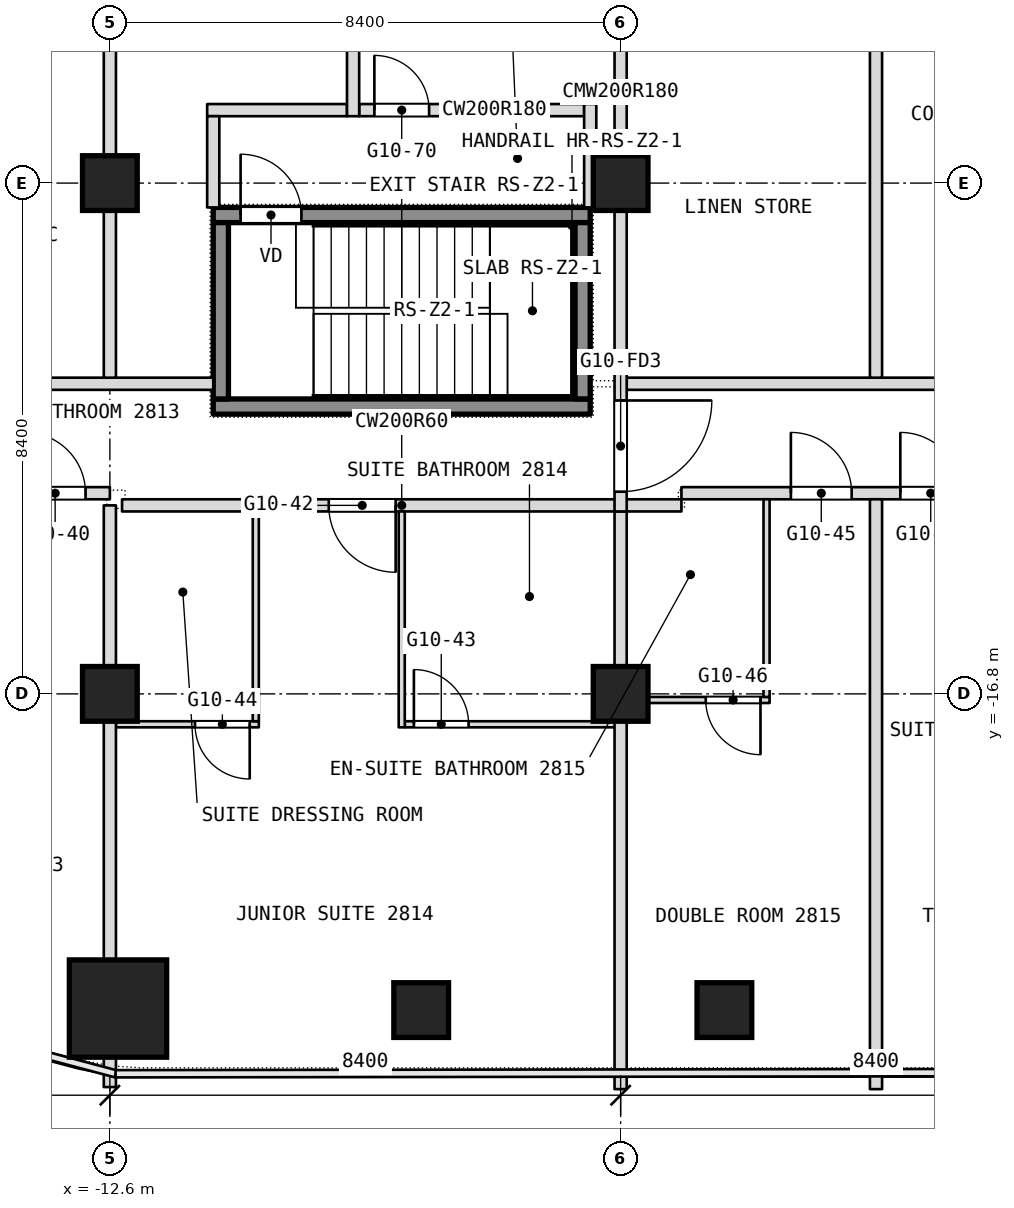
"""IFC4 building model, lengths in metres.
Left out: names, types, materials, properties, quantities, classifications, styles, units other than length and angle.
Written with IfcOpenShell. Run it as: python <this file> out.ifc"""

import sys

from ifc_helpers import new_model, si_unit, direction, frame, frame_2d, origin, origin_2d, place, context, subcontext, project, spatial, rectangle, extrude, element, fill, save


model = new_model("IFC4")
c1 = context("Model", 3, precision=1e-05, world=origin(), true_north=direction((0.0, 1.0)))
c2 = subcontext(c1, "Body", "Model", "MODEL_VIEW")
j1 = project(units=[si_unit("LENGTHUNIT", "METRE"), si_unit("PLANEANGLEUNIT", "RADIAN")], contexts=[c1])
p1 = place(None, origin())
s1 = spatial("IfcSite", under=j1, at=p1, CompositionType="ELEMENT")
p2 = place(p1, origin())
s2 = spatial("IfcBuilding", under=s1, at=p2, CompositionType="ELEMENT")
p3 = place(p2, frame((0.0, 0.0, 126.5)))
s3 = spatial("IfcBuildingStorey", under=s2, at=p3, CompositionType="ELEMENT", Elevation=126.5)
p4 = place(p3, frame((-12.466, -21.975, 0.0), z_axis=(0.0, 0.0, 1.0), x_axis=(1.0, 0.0, 0.0)))
e1 = element("IfcColumn", 1, at=p4, inside=s3, PredefinedType="COLUMN", context=c2, shape_type="SweptSolid", body=[
    extrude(rectangle(XDim=1.6, YDim=1.6, at=origin_2d()), origin(), (0.0, 0.0, 1.0), 3.6),
])
for number, where, z_axis, x_axis in (
    (2, (-12.6, -16.8, 0.0), (0.0, 0.0, 1.0), (1.0, 0.0, 0.0)),
    (3, (-12.6, -8.4, 0.0), (0.0, 0.0, 1.0), (1.0, 0.0, 0.0)),
    (4, (-4.2, -16.8, 0.0), (0.0, 0.0, 1.0), (1.0, 0.0, 0.0)),
    (5, (-4.2, -8.4, 0.0), (0.0, 0.0, 1.0), (1.0, 0.0, 0.0)),
    (6, (-2.493, -22.0, 0.0), (0.0, 0.0, 1.0), (1.0, 0.0, 0.0)),
    (7, (-7.48, -22.0, 0.0), (0.0, 0.0, 1.0), (1.0, 0.0, 0.0)),
):
    element("IfcColumn", number, at=place(p3, frame(where, z_axis=z_axis, x_axis=x_axis)), inside=s3, PredefinedType="COLUMN", context=c2, shape_type="SweptSolid", body=[
        extrude(rectangle(XDim=0.9, YDim=0.9, at=origin_2d()), origin(), (0.0, 0.0, 1.0), 3.6),
    ])
p5 = place(p3, frame((-12.5, -17.3, 0.0), z_axis=(0.0, 0.0, 1.0), x_axis=(1.0, 0.0, 0.0)))
e8 = element("IfcWall", 8, at=p5, inside=s3, PredefinedType="PARTITIONING", context=c2, shape_type="SweptSolid", body=[
    extrude(rectangle(XDim=2.35, YDim=0.1, at=frame_2d((1.175, 0.0))), origin(), (0.0, 0.0, 1.0), 3.34),
])
p6 = place(p5, frame((1.3, 0.0, 0.0)))
e9 = element("IfcOpeningElement", 9, at=p6, cuts=e8, PredefinedType="OPENING", context=c2, shape_type="SweptSolid", body=[
    extrude(rectangle(XDim=0.9, YDim=2.1, at=frame_2d((0.45, 1.05))), frame((0.0, 0.05, 0.0), z_axis=(0.0, -1.0, 0.0), x_axis=(1.0, 0.0, 0.0)), (0.0, 0.0, 1.0), 0.1),
])
p7 = place(p3, frame((-7.75, -17.3, 0.0), z_axis=(0.0, 0.0, 1.0), x_axis=(1.0, 0.0, 0.0)))
e10 = element("IfcWall", 10, at=p7, inside=s3, PredefinedType="PARTITIONING", context=c2, shape_type="SweptSolid", body=[
    extrude(rectangle(XDim=3.65, YDim=0.1, at=frame_2d((1.825, 0.0))), origin(), (0.0, 0.0, 1.0), 3.34),
])
p8 = place(p7, frame((0.15, 0.0, 0.0)))
e11 = element("IfcOpeningElement", 11, at=p8, cuts=e10, PredefinedType="OPENING", context=c2, shape_type="SweptSolid", body=[
    extrude(rectangle(XDim=0.9, YDim=2.1, at=frame_2d((0.45, 1.05))), frame((0.0, 0.05, 0.0), z_axis=(0.0, -1.0, 0.0), x_axis=(1.0, 0.0, 0.0)), (0.0, 0.0, 1.0), 0.1),
])
p9 = place(p3, frame((-4.1, -16.9, 0.0), z_axis=(0.0, 0.0, 1.0), x_axis=(1.0, 0.0, 0.0)))
e12 = element("IfcWall", 12, at=p9, inside=s3, PredefinedType="PARTITIONING", context=c2, shape_type="SweptSolid", body=[
    extrude(rectangle(XDim=2.35, YDim=0.1, at=frame_2d((1.175, 0.0))), origin(), (0.0, 0.0, 1.0), 2.89),
])
p10 = place(p9, frame((1.3, 0.0, 0.0)))
e13 = element("IfcOpeningElement", 13, at=p10, cuts=e12, PredefinedType="OPENING", context=c2, shape_type="SweptSolid", body=[
    extrude(rectangle(XDim=0.9, YDim=2.1, at=frame_2d((0.45, 1.05))), frame((0.0, 0.05, 0.0), z_axis=(0.0, -1.0, 0.0), x_axis=(1.0, 0.0, 0.0)), (0.0, 0.0, 1.0), 0.1),
])
p11 = place(p3, frame((-12.4, -13.7, 0.0), z_axis=(0.0, 0.0, 1.0), x_axis=(1.0, 0.0, 0.0)))
e14 = element("IfcWall", 14, at=p11, inside=s3, PredefinedType="PARTITIONING", context=c2, shape_type="SweptSolid", body=[
    extrude(rectangle(XDim=9.2, YDim=0.2, at=frame_2d((4.6, 0.0))), origin(), (0.0, 0.0, 1.0), 3.34),
])
p12 = place(p11, frame((3.4, 0.0, 0.0)))
e15 = element("IfcOpeningElement", 15, at=p12, cuts=e14, PredefinedType="OPENING", context=c2, shape_type="SweptSolid", body=[
    extrude(rectangle(XDim=1.1, YDim=2.1, at=frame_2d((0.55, 1.05))), frame((0.0, 0.1, 0.0), z_axis=(0.0, -1.0, 0.0), x_axis=(1.0, 0.0, 0.0)), (0.0, 0.0, 1.0), 0.2),
])
p13 = place(p3, frame((-16.7, -13.5, 0.0), z_axis=(0.0, 0.0, 1.0), x_axis=(1.0, 0.0, 0.0)))
e16 = element("IfcWall", 16, at=p13, inside=s3, PredefinedType="PARTITIONING", context=c2, shape_type="SweptSolid", body=[
    extrude(rectangle(XDim=4.1, YDim=0.2, at=frame_2d((2.05, 0.0))), origin(), (0.0, 0.0, 1.0), 3.34),
])
p14 = place(p13, frame((2.7, 0.0, 0.0)))
e17 = element("IfcOpeningElement", 17, at=p14, cuts=e16, PredefinedType="OPENING", context=c2, shape_type="SweptSolid", body=[
    extrude(rectangle(XDim=1.0, YDim=2.1, at=frame_2d((0.5, 1.05))), frame((0.0, 0.1, 0.0), z_axis=(0.0, -1.0, 0.0), x_axis=(1.0, 0.0, 0.0)), (0.0, 0.0, 1.0), 0.2),
])
p15 = place(p3, frame((-3.2, -13.5, 0.0), z_axis=(0.0, 0.0, 1.0), x_axis=(1.0, 0.0, 0.0)))
e18 = element("IfcWall", 18, at=p15, inside=s3, PredefinedType="PARTITIONING", context=c2, shape_type="SweptSolid", body=[
    extrude(rectangle(XDim=19.9, YDim=0.2, at=frame_2d((9.95, 0.0))), origin(), (0.0, 0.0, 1.0), 3.34),
])
p16 = place(p15, frame((1.8, 0.0, 0.0)))
e19 = element("IfcOpeningElement", 19, at=p16, cuts=e18, PredefinedType="OPENING", context=c2, shape_type="SweptSolid", body=[
    extrude(rectangle(XDim=1.0, YDim=2.1, at=frame_2d((0.5, 1.05))), frame((0.0, 0.1, 0.0), z_axis=(0.0, -1.0, 0.0), x_axis=(1.0, 0.0, 0.0)), (0.0, 0.0, 1.0), 0.2),
])
p17 = place(p15, frame((3.6, 0.0, 0.0)))
e20 = element("IfcOpeningElement", 20, at=p17, cuts=e18, PredefinedType="OPENING", context=c2, shape_type="SweptSolid", body=[
    extrude(rectangle(XDim=1.0, YDim=2.1, at=frame_2d((0.5, 1.05))), frame((0.0, 0.1, 0.0), z_axis=(0.0, -1.0, 0.0), x_axis=(1.0, 0.0, 0.0)), (0.0, 0.0, 1.0), 0.2),
])
p18 = place(p15, frame((11.0, 0.0, 0.0)))
e21 = element("IfcOpeningElement", 21, at=p18, cuts=e18, PredefinedType="OPENING", context=c2, shape_type="SweptSolid", body=[
    extrude(rectangle(XDim=1.1, YDim=2.1, at=frame_2d((0.55, 1.05))), frame((0.0, 0.1, 0.0), z_axis=(0.0, -1.0, 0.0), x_axis=(1.0, 0.0, 0.0)), (0.0, 0.0, 1.0), 0.2),
])
p19 = place(p15, frame((18.6, 0.0, 0.0)))
e22 = element("IfcOpeningElement", 22, at=p19, cuts=e18, PredefinedType="OPENING", context=c2, shape_type="SweptSolid", body=[
    extrude(rectangle(XDim=1.0, YDim=2.1, at=frame_2d((0.5, 1.05))), frame((0.0, 0.1, 0.0), z_axis=(0.0, -1.0, 0.0), x_axis=(1.0, 0.0, 0.0)), (0.0, 0.0, 1.0), 0.2),
])
p20 = place(p3, frame((-16.7, -11.7, 0.0), z_axis=(0.0, 0.0, 1.0), x_axis=(1.0, 0.0, 0.0)))
e23 = element("IfcWall", 23, at=p20, inside=s3, PredefinedType="PARTITIONING", context=c2, shape_type="SweptSolid", body=[
    extrude(rectangle(XDim=5.8, YDim=0.2, at=frame_2d((2.9, 0.0))), origin(), (0.0, 0.0, 1.0), 3.34),
])
p21 = place(p3, frame((-4.1, -11.7, 0.0), z_axis=(0.0, 0.0, 1.0), x_axis=(1.0, 0.0, 0.0)))
e24 = element("IfcWall", 24, at=p21, inside=s3, PredefinedType="PARTITIONING", context=c2, shape_type="SweptSolid", body=[
    extrude(rectangle(XDim=20.8, YDim=0.2, at=frame_2d((10.4, 0.0))), origin(), (0.0, 0.0, 1.0), 3.34),
])
p22 = place(p21, frame((14.1, 0.0, 0.0)))
e25 = element("IfcOpeningElement", 25, at=p22, cuts=e24, PredefinedType="OPENING", context=c2, shape_type="SweptSolid", body=[
    extrude(rectangle(XDim=1.0, YDim=2.1, at=frame_2d((0.5, 1.05))), frame((0.0, 0.1, 0.0), z_axis=(0.0, -1.0, 0.0), x_axis=(1.0, 0.0, 0.0)), (0.0, 0.0, 1.0), 0.2),
])
p23 = place(p3, frame((-11.0, -7.2, 0.0), z_axis=(0.0, 0.0, 1.0), x_axis=(1.0, 0.0, 0.0)))
e26 = element("IfcWall", 26, at=p23, inside=s3, PredefinedType="PARTITIONING", context=c2, shape_type="SweptSolid", body=[
    extrude(rectangle(XDim=2.3, YDim=0.2, at=frame_2d((1.15, 0.0))), origin(), (0.0, 0.0, 1.0), 3.34),
])
p24 = place(p3, frame((-8.5, -7.2, 0.0), z_axis=(0.0, 0.0, 1.0), x_axis=(1.0, 0.0, 0.0)))
e27 = element("IfcWall", 27, at=p24, inside=s3, PredefinedType="PARTITIONING", context=c2, shape_type="SweptSolid", body=[
    extrude(rectangle(XDim=3.7, YDim=0.2, at=frame_2d((1.85, 0.0))), origin(), (0.0, 0.0, 1.0), 3.34),
])
p25 = place(p24, frame((0.25, 0.0, 0.0)))
e28 = element("IfcOpeningElement", 28, at=p25, cuts=e27, PredefinedType="OPENING", context=c2, shape_type="SweptSolid", body=[
    extrude(rectangle(XDim=0.9, YDim=2.1, at=frame_2d((0.45, 1.05))), frame((0.0, 0.1, 0.0), z_axis=(0.0, -1.0, 0.0), x_axis=(1.0, 0.0, 0.0)), (0.0, 0.0, 1.0), 0.2),
])
p26 = place(p3, frame((0.0, -23.3, 0.0), z_axis=(0.0, 0.0, 1.0), x_axis=(0.0, 1.0, 0.0)))
e29 = element("IfcWall", 29, at=p26, inside=s3, PredefinedType="PARTITIONING", context=c2, shape_type="SweptSolid", body=[
    extrude(rectangle(XDim=9.7, YDim=0.2, at=frame_2d((4.85, 0.0))), origin(), (0.0, 0.0, 1.0), 3.34),
])
p27 = place(p3, frame((0.0, -11.6, 0.0), z_axis=(0.0, 0.0, 1.0), x_axis=(0.0, 1.0, 0.0)))
e30 = element("IfcWall", 30, at=p27, inside=s3, PredefinedType="PARTITIONING", context=c2, shape_type="SweptSolid", body=[
    extrude(rectangle(XDim=9.7, YDim=0.2, at=frame_2d((4.85, 0.0))), origin(), (0.0, 0.0, 1.0), 3.34),
])
p28 = place(p3, frame((-1.8, -16.85, 0.0), z_axis=(0.0, 0.0, 1.0), x_axis=(0.0, 1.0, 0.0)))
e31 = element("IfcWall", 31, at=p28, inside=s3, PredefinedType="PARTITIONING", context=c2, shape_type="SweptSolid", body=[
    extrude(rectangle(XDim=3.25, YDim=0.1, at=frame_2d((1.625, 0.0))), origin(), (0.0, 0.0, 1.0), 3.34),
])
p29 = place(p3, frame((-4.2, -23.3, 0.0), z_axis=(0.0, 0.0, 1.0), x_axis=(0.0, 1.0, 0.0)))
e32 = element("IfcWall", 32, at=p29, inside=s3, PredefinedType="PARTITIONING", context=c2, shape_type="SweptSolid", body=[
    extrude(rectangle(XDim=9.5, YDim=0.2, at=frame_2d((4.75, 0.0))), origin(), (0.0, 0.0, 1.0), 3.34),
])
p30 = place(p3, frame((-4.2, -13.8, 0.0), z_axis=(0.0, 0.0, 1.0), x_axis=(0.0, 1.0, 0.0)))
e33 = element("IfcWall", 33, at=p30, inside=s3, PredefinedType="PARTITIONING", context=c2, shape_type="SweptSolid", body=[
    extrude(rectangle(XDim=13.8, YDim=0.2, at=frame_2d((6.9, 0.0))), origin(), (0.0, 0.0, 1.0), 3.34),
])
p31 = place(p30, frame((12.15, 0.0, 0.0)))
e34 = element("IfcOpeningElement", 34, at=p31, cuts=e33, PredefinedType="OPENING", context=c2, shape_type="SweptSolid", body=[
    extrude(rectangle(XDim=1.5, YDim=2.1, at=frame_2d((0.75, 1.05))), frame((0.0, 0.1, 0.0), z_axis=(0.0, -1.0, 0.0), x_axis=(1.0, 0.0, 0.0)), (0.0, 0.0, 1.0), 0.2),
])
p32 = place(p30, frame((0.325, 0.0, 0.0)))
e35 = element("IfcOpeningElement", 35, at=p32, cuts=e33, PredefinedType="OPENING", context=c2, shape_type="SweptSolid", body=[
    extrude(rectangle(XDim=1.5, YDim=2.1, at=frame_2d((0.75, 1.05))), frame((0.0, 0.1, 0.0), z_axis=(0.0, -1.0, 0.0), x_axis=(1.0, 0.0, 0.0)), (0.0, 0.0, 1.0), 0.2),
])
p33 = place(p3, frame((-4.7, -8.8, 0.0), z_axis=(0.0, 0.0, 1.0), x_axis=(0.0, 1.0, 0.0)))
e36 = element("IfcWall", 36, at=p33, inside=s3, PredefinedType="PARTITIONING", context=c2, shape_type="SweptSolid", body=[
    extrude(rectangle(XDim=1.7, YDim=0.2, at=frame_2d((0.85, 0.0))), origin(), (0.0, 0.0, 1.0), 3.34),
])
p34 = place(p3, frame((-7.8, -17.35, 0.0), z_axis=(0.0, 0.0, 1.0), x_axis=(0.0, 1.0, 0.0)))
e37 = element("IfcWall", 37, at=p34, inside=s3, PredefinedType="PARTITIONING", context=c2, shape_type="SweptSolid", body=[
    extrude(rectangle(XDim=3.55, YDim=0.1, at=frame_2d((1.775, 0.0))), origin(), (0.0, 0.0, 1.0), 3.34),
])
p35 = place(p3, frame((-8.6, -7.3, 0.0), z_axis=(0.0, 0.0, 1.0), x_axis=(0.0, 1.0, 0.0)))
e38 = element("IfcWall", 38, at=p35, inside=s3, PredefinedType="PARTITIONING", context=c2, shape_type="SweptSolid", body=[
    extrude(rectangle(XDim=5.6, YDim=0.2, at=frame_2d((2.8, 0.0))), origin(), (0.0, 0.0, 1.0), 3.34),
])
p36 = place(p3, frame((-10.2, -17.25, 0.0), z_axis=(0.0, 0.0, 1.0), x_axis=(0.0, 1.0, 0.0)))
e39 = element("IfcWall", 39, at=p36, inside=s3, PredefinedType="PARTITIONING", context=c2, shape_type="SweptSolid", body=[
    extrude(rectangle(XDim=3.45, YDim=0.1, at=frame_2d((1.725, 0.0))), origin(), (0.0, 0.0, 1.0), 3.34),
])
p37 = place(p3, frame((-10.9, -8.8, 0.0), z_axis=(0.0, 0.0, 1.0), x_axis=(0.0, 1.0, 0.0)))
e40 = element("IfcWall", 40, at=p37, inside=s3, PredefinedType="PARTITIONING", context=c2, shape_type="SweptSolid", body=[
    extrude(rectangle(XDim=1.5, YDim=0.2, at=frame_2d((0.75, 0.0))), origin(), (0.0, 0.0, 1.0), 3.34),
])
p38 = place(p3, frame((-12.6, -23.266, 0.0), z_axis=(0.0, 0.0, 1.0), x_axis=(0.0, 1.0, 0.0)))
e41 = element("IfcWall", 41, at=p38, inside=s3, PredefinedType="PARTITIONING", context=c2, shape_type="SweptSolid", body=[
    extrude(rectangle(XDim=0.491, YDim=0.2, at=frame_2d((0.246, 0.0))), origin(), (0.0, 0.0, 1.0), 3.34),
])
p39 = place(p3, frame((-12.6, -21.175, 0.0), z_axis=(0.0, 0.0, 1.0), x_axis=(0.0, 1.0, 0.0)))
e42 = element("IfcWall", 42, at=p39, inside=s3, PredefinedType="PARTITIONING", context=c2, shape_type="SweptSolid", body=[
    extrude(rectangle(XDim=7.475, YDim=0.2, at=frame_2d((3.738, 0.0))), origin(), (0.0, 0.0, 1.0), 3.34),
])
p40 = place(p3, frame((-12.6, -11.6, 0.0), z_axis=(0.0, 0.0, 1.0), x_axis=(0.0, 1.0, 0.0)))
e43 = element("IfcWall", 43, at=p40, inside=s3, PredefinedType="PARTITIONING", context=c2, shape_type="SweptSolid", body=[
    extrude(rectangle(XDim=9.7, YDim=0.2, at=frame_2d((4.85, 0.0))), origin(), (0.0, 0.0, 1.0), 3.34),
])
p41 = place(p3, frame((-10.9, -12.075, 0.1), z_axis=(0.0, 0.0, 1.0), x_axis=(1.0, 0.0, 0.0)))
e44 = element("IfcWall", 44, at=p41, inside=s3, PredefinedType="SHEAR", context=c2, shape_type="SweptSolid", body=[
    extrude(rectangle(XDim=6.2, YDim=0.25, at=frame_2d((3.1, 0.0))), origin(), (0.0, 0.0, 1.0), 3.6),
])
p42 = place(p3, frame((-10.9, -8.925, 0.1), z_axis=(0.0, 0.0, 1.0), x_axis=(1.0, 0.0, 0.0)))
e45 = element("IfcWall", 45, at=p42, inside=s3, PredefinedType="SHEAR", context=c2, shape_type="SweptSolid", body=[
    extrude(rectangle(XDim=6.2, YDim=0.25, at=frame_2d((3.1, 0.0))), origin(), (0.0, 0.0, 1.0), 3.6),
])
p43 = place(p42, frame((0.45, 0.0, 0.0)))
e46 = element("IfcOpeningElement", 46, at=p43, cuts=e45, PredefinedType="OPENING", context=c2, shape_type="SweptSolid", body=[
    extrude(rectangle(XDim=1.0, YDim=2.1, at=frame_2d((0.5, 1.05))), frame((0.0, 0.125, 0.0), z_axis=(0.0, -1.0, 0.0), x_axis=(1.0, 0.0, 0.0)), (0.0, 0.0, 1.0), 0.25),
])
for number, where, z_axis, x_axis in (
    (47, (-10.775, -11.95, 0.1), (0.0, 0.0, 1.0), (0.0, 1.0, 0.0)),
    (48, (-4.825, -11.95, 0.1), (0.0, 0.0, 1.0), (0.0, 1.0, 0.0)),
):
    element("IfcWall", number, at=place(p3, frame(where, z_axis=z_axis, x_axis=x_axis)), inside=s3, PredefinedType="SHEAR", context=c2, shape_type="SweptSolid", body=[
        extrude(rectangle(XDim=2.9, YDim=0.25, at=frame_2d((1.45, 0.0))), origin(), (0.0, 0.0, 1.0), 3.6),
    ])
p44 = place(p6, origin())
e49 = element("IfcDoor", 49, at=p44, inside=s3, OperationType="SINGLE_SWING_RIGHT", PredefinedType="DOOR", context=c2, shape_type="SweptSolid", body=[
    extrude(rectangle(XDim=0.9, YDim=2.1, at=frame_2d((0.45, 1.05))), frame((0.0, 0.025, 0.0), z_axis=(0.0, -1.0, 0.0), x_axis=(1.0, 0.0, 0.0)), (0.0, 0.0, 1.0), 0.05),
])
fill(e9, e49)
p45 = place(p8, origin())
e50 = element("IfcDoor", 50, at=p45, inside=s3, OperationType="SINGLE_SWING_LEFT", PredefinedType="DOOR", context=c2, shape_type="SweptSolid", body=[
    extrude(rectangle(XDim=0.9, YDim=2.1, at=frame_2d((0.45, 1.05))), frame((0.0, 0.025, 0.0), z_axis=(0.0, -1.0, 0.0), x_axis=(1.0, 0.0, 0.0)), (0.0, 0.0, 1.0), 0.05),
])
fill(e11, e50)
p46 = place(p10, origin())
e51 = element("IfcDoor", 51, at=p46, inside=s3, OperationType="SINGLE_SWING_RIGHT", PredefinedType="DOOR", context=c2, shape_type="SweptSolid", body=[
    extrude(rectangle(XDim=0.9, YDim=2.1, at=frame_2d((0.45, 1.05))), frame((0.0, 0.025, 0.0), z_axis=(0.0, -1.0, 0.0), x_axis=(1.0, 0.0, 0.0)), (0.0, 0.0, 1.0), 0.05),
])
fill(e13, e51)
p47 = place(p12, origin())
e52 = element("IfcDoor", 52, at=p47, inside=s3, OperationType="SINGLE_SWING_LEFT", PredefinedType="DOOR", context=c2, shape_type="SweptSolid", body=[
    extrude(rectangle(XDim=1.1, YDim=2.1, at=frame_2d((0.55, 1.05))), frame((0.0, 0.025, 0.0), z_axis=(0.0, -1.0, 0.0), x_axis=(1.0, 0.0, 0.0)), (0.0, 0.0, 1.0), 0.05),
])
fill(e15, e52)
p48 = place(p14, origin())
e53 = element("IfcDoor", 53, at=p48, inside=s3, OperationType="SINGLE_SWING_RIGHT", PredefinedType="DOOR", context=c2, shape_type="SweptSolid", body=[
    extrude(rectangle(XDim=1.0, YDim=2.1, at=frame_2d((0.5, 1.05))), frame((0.0, 0.025, 0.0), z_axis=(0.0, -1.0, 0.0), x_axis=(1.0, 0.0, 0.0)), (0.0, 0.0, 1.0), 0.05),
])
fill(e17, e53)
p49 = place(p16, origin())
e54 = element("IfcDoor", 54, at=p49, inside=s3, OperationType="SINGLE_SWING_LEFT", PredefinedType="DOOR", context=c2, shape_type="SweptSolid", body=[
    extrude(rectangle(XDim=1.0, YDim=2.1, at=frame_2d((0.5, 1.05))), frame((0.0, 0.025, 0.0), z_axis=(0.0, -1.0, 0.0), x_axis=(1.0, 0.0, 0.0)), (0.0, 0.0, 1.0), 0.05),
])
fill(e19, e54)
p50 = place(p17, origin())
e55 = element("IfcDoor", 55, at=p50, inside=s3, OperationType="SINGLE_SWING_LEFT", PredefinedType="DOOR", context=c2, shape_type="SweptSolid", body=[
    extrude(rectangle(XDim=1.0, YDim=2.1, at=frame_2d((0.5, 1.05))), frame((0.0, 0.025, 0.0), z_axis=(0.0, -1.0, 0.0), x_axis=(1.0, 0.0, 0.0)), (0.0, 0.0, 1.0), 0.05),
])
fill(e20, e55)
p51 = place(p25, origin())
e56 = element("IfcDoor", 56, at=p51, inside=s3, OperationType="SINGLE_SWING_RIGHT", PredefinedType="DOOR", context=c2, shape_type="SweptSolid", body=[
    extrude(rectangle(XDim=0.9, YDim=2.1, at=frame_2d((0.45, 1.05))), frame((0.0, 0.025, 0.0), z_axis=(0.0, -1.0, 0.0), x_axis=(1.0, 0.0, 0.0)), (0.0, 0.0, 1.0), 0.05),
])
fill(e28, e56)
p52 = place(p43, origin())
e57 = element("IfcDoor", 57, at=p52, inside=s3, OperationType="SINGLE_SWING_LEFT", PredefinedType="DOOR", context=c2, shape_type="SweptSolid", body=[
    extrude(rectangle(XDim=1.0, YDim=2.1, at=frame_2d((0.5, 1.05))), frame((0.0, 0.025, 0.0), z_axis=(0.0, -1.0, 0.0), x_axis=(1.0, 0.0, 0.0)), (0.0, 0.0, 1.0), 0.05),
])
fill(e46, e57)
p53 = place(p32, origin())
e58 = element("IfcDoor", 58, at=p53, inside=s3, OperationType="DOUBLE_DOOR_DOUBLE_SWING", PredefinedType="DOOR", context=c2, shape_type="SweptSolid", body=[
    extrude(rectangle(XDim=1.5, YDim=2.1, at=frame_2d((0.75, 1.05))), frame((0.0, 0.025, 0.0), z_axis=(0.0, -1.0, 0.0), x_axis=(1.0, 0.0, 0.0)), (0.0, 0.0, 1.0), 0.05),
])
fill(e35, e58)
save(model, sys.argv[1])
